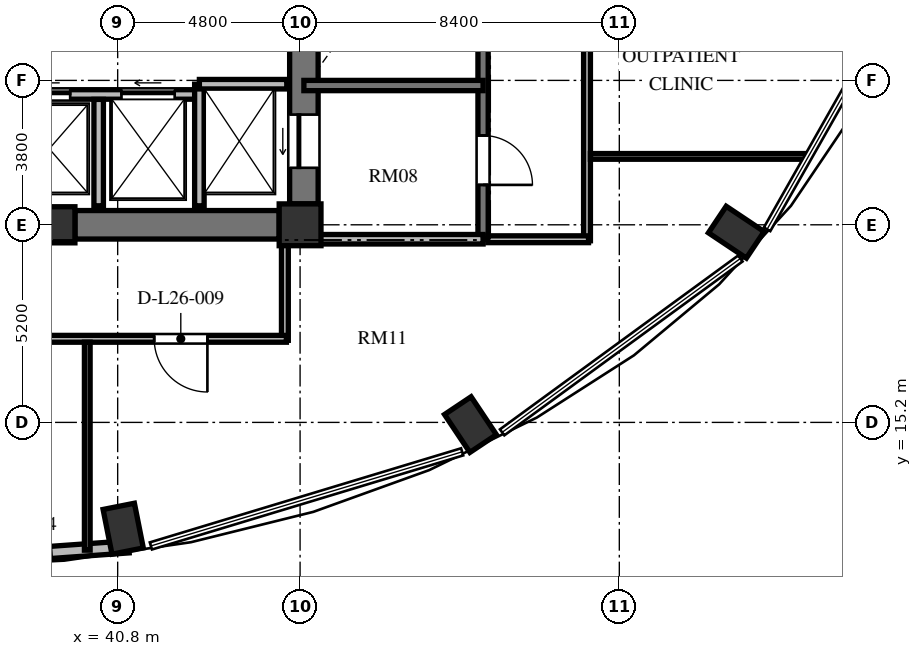
"""IFC4 building model, lengths in metres.
Left out: names, types, materials, properties, quantities, classifications, styles, units other than length and angle.
Written with IfcOpenShell. Run it as: python <this file> out.ifc"""

import sys

from ifc_helpers import new_model, si_unit, direction, frame, frame_2d, origin, origin_2d, place, context, subcontext, project, spatial, rectangle, extrude, element, fill, save


model = new_model("IFC4")
c1 = context("Model", 3, precision=1e-05, world=origin(), true_north=direction((0.0, 1.0)))
c2 = subcontext(c1, "Body", "Model", "MODEL_VIEW")
j1 = project(units=[si_unit("LENGTHUNIT", "METRE"), si_unit("PLANEANGLEUNIT", "RADIAN")], contexts=[c1])
p1 = place(None, origin())
s1 = spatial("IfcSite", under=j1, at=p1, CompositionType="ELEMENT")
p2 = place(p1, origin())
s2 = spatial("IfcBuilding", under=s1, at=p2, CompositionType="ELEMENT")
p3 = place(p2, frame((0.0, 0.0, 103.632)))
s3 = spatial("IfcBuildingStorey", under=s2, at=p3, CompositionType="ELEMENT", Elevation=103.632)
for number, where, z_axis, x_axis in (
    (1, (40.946, 12.403, 0.0), (0.0, 0.0, 1.0), (0.195, -0.981, 0.0)),
    (2, (50.084, 15.143, 0.0), (0.0, 0.0, 1.0), (0.556, -0.831, 0.0)),
    (3, (57.078, 20.205, 0.0), (0.0, 0.0, 1.0), (0.831, -0.556, 0.0)),
):
    element("IfcColumn", number, at=place(p3, frame(where, z_axis=z_axis, x_axis=x_axis)), inside=s3, PredefinedType="COLUMN", context=c2, shape_type="SweptSolid", body=[
        extrude(rectangle(XDim=1.2, YDim=0.84, at=origin_2d()), origin(), (0.0, 0.0, 1.0), 3.648),
    ])
p4 = place(p3, frame((39.2, 20.4, 0.0), z_axis=(0.0, 0.0, 1.0), x_axis=(1.0, 0.0, 0.0)))
e4 = element("IfcColumn", 4, at=p4, inside=s3, PredefinedType="COLUMN", context=c2, shape_type="SweptSolid", body=[
    extrude(rectangle(XDim=0.95, YDim=0.95, at=origin_2d()), origin(), (0.0, 0.0, 1.0), 3.648),
])
p5 = place(p3, frame((45.6, 20.4, 0.0), z_axis=(0.0, 0.0, 1.0), x_axis=(1.0, 0.0, 0.0)))
e5 = element("IfcColumn", 5, at=p5, inside=s3, PredefinedType="COLUMN", context=c2, shape_type="SweptSolid", body=[
    extrude(rectangle(XDim=1.1, YDim=1.1, at=origin_2d()), origin(), (0.0, 0.0, 1.0), 3.648),
])
p6 = place(p3, frame((45.7, 20.95, 0.0), z_axis=(0.0, 0.0, 1.0), x_axis=(0.0, 1.0, 0.0)))
e6 = element("IfcWall", 6, at=p6, inside=s3, PredefinedType="SHEAR", context=c2, shape_type="SweptSolid", body=[
    extrude(rectangle(XDim=14.1, YDim=0.75, at=frame_2d((7.05, 0.0))), origin(), (0.0, 0.0, 1.0), 3.648),
])
p7 = place(p6, frame((11.75, 0.0, 0.0)))
e7 = element("IfcOpeningElement", 7, at=p7, cuts=e6, PredefinedType="OPENING", context=c2, shape_type="SweptSolid", body=[
    extrude(rectangle(XDim=1.4, YDim=2.3, at=frame_2d((0.7, 1.15))), frame((0.0, 0.385, 0.0), z_axis=(0.0, -1.0, 0.0), x_axis=(1.0, 0.0, 0.0)), (0.0, 0.0, 1.0), 0.77),
])
p8 = place(p6, frame((0.95, 0.0, 0.0)))
e8 = element("IfcOpeningElement", 8, at=p8, cuts=e6, PredefinedType="OPENING", context=c2, shape_type="SweptSolid", body=[
    extrude(rectangle(XDim=1.4, YDim=2.3, at=frame_2d((0.7, 1.15))), frame((0.0, 0.385, 0.0), z_axis=(0.0, -1.0, 0.0), x_axis=(1.0, 0.0, 0.0)), (0.0, 0.0, 1.0), 0.77),
])
p9 = place(p3, frame((39.675, 20.4, 0.0), z_axis=(0.0, 0.0, 1.0), x_axis=(1.0, 0.0, 0.0)))
e9 = element("IfcWall", 9, at=p9, inside=s3, PredefinedType="SHEAR", context=c2, shape_type="SweptSolid", body=[
    extrude(rectangle(XDim=5.375, YDim=0.75, at=frame_2d((2.688, 0.0))), origin(), (0.0, 0.0, 1.0), 3.648),
])
p10 = place(p3, frame((35.821, 11.547, 0.0), z_axis=(0.0, 0.0, 1.0), x_axis=(0.997432364291, 0.071614793619, 0.0)))
e10 = element("IfcWall", 10, at=p10, inside=s3, PredefinedType="SOLIDWALL", context=c2, shape_type="SweptSolid", body=[
    extrude(rectangle(XDim=5.284, YDim=0.32, at=frame_2d((2.642, 0.0))), origin(), (0.0, 0.0, 1.0), 3.428),
])
p11 = place(p10, frame((2.042, 0.0, 0.85)))
e11 = element("IfcOpeningElement", 11, at=p11, cuts=e10, PredefinedType="OPENING", context=c2, shape_type="SweptSolid", body=[
    extrude(rectangle(XDim=1.2, YDim=1.8, at=frame_2d((0.6, 0.9))), frame((0.0, 0.17, 0.0), z_axis=(0.0, -1.0, 0.0), x_axis=(1.0, 0.0, 0.0)), (0.0, 0.0, 1.0), 0.34),
])
p12 = place(p3, frame((26.75, 23.83, 0.0), z_axis=(0.0, 0.0, 1.0), x_axis=(1.0, 0.0, 0.0)))
e12 = element("IfcWall", 12, at=p12, inside=s3, PredefinedType="SOLIDWALL", context=c2, shape_type="SweptSolid", body=[
    extrude(rectangle(XDim=16.2, YDim=0.25, at=frame_2d((8.1, 0.0))), origin(), (0.0, 0.0, 1.0), 3.428),
])
p13 = place(p12, frame((0.9, 0.0, 0.0)))
e13 = element("IfcOpeningElement", 13, at=p13, cuts=e12, PredefinedType="OPENING", context=c2, shape_type="SweptSolid", body=[
    extrude(rectangle(XDim=1.1, YDim=2.2, at=frame_2d((0.55, 1.1))), frame((0.0, 0.135, 0.0), z_axis=(0.0, -1.0, 0.0), x_axis=(1.0, 0.0, 0.0)), (0.0, 0.0, 1.0), 0.27),
])
p14 = place(p12, frame((3.5, 0.0, 0.0)))
e14 = element("IfcOpeningElement", 14, at=p14, cuts=e12, PredefinedType="OPENING", context=c2, shape_type="SweptSolid", body=[
    extrude(rectangle(XDim=1.1, YDim=2.2, at=frame_2d((0.55, 1.1))), frame((0.0, 0.135, 0.0), z_axis=(0.0, -1.0, 0.0), x_axis=(1.0, 0.0, 0.0)), (0.0, 0.0, 1.0), 0.27),
])
p15 = place(p12, frame((6.3, 0.0, 0.0)))
e15 = element("IfcOpeningElement", 15, at=p15, cuts=e12, PredefinedType="OPENING", context=c2, shape_type="SweptSolid", body=[
    extrude(rectangle(XDim=1.1, YDim=2.2, at=frame_2d((0.55, 1.1))), frame((0.0, 0.135, 0.0), z_axis=(0.0, -1.0, 0.0), x_axis=(1.0, 0.0, 0.0)), (0.0, 0.0, 1.0), 0.27),
])
p16 = place(p12, frame((8.9, 0.0, 0.0)))
e16 = element("IfcOpeningElement", 16, at=p16, cuts=e12, PredefinedType="OPENING", context=c2, shape_type="SweptSolid", body=[
    extrude(rectangle(XDim=1.1, YDim=2.2, at=frame_2d((0.55, 1.1))), frame((0.0, 0.135, 0.0), z_axis=(0.0, -1.0, 0.0), x_axis=(1.0, 0.0, 0.0)), (0.0, 0.0, 1.0), 0.27),
])
p17 = place(p12, frame((11.7, 0.0, 0.0)))
e17 = element("IfcOpeningElement", 17, at=p17, cuts=e12, PredefinedType="OPENING", context=c2, shape_type="SweptSolid", body=[
    extrude(rectangle(XDim=1.1, YDim=2.2, at=frame_2d((0.55, 1.1))), frame((0.0, 0.135, 0.0), z_axis=(0.0, -1.0, 0.0), x_axis=(1.0, 0.0, 0.0)), (0.0, 0.0, 1.0), 0.27),
])
p18 = place(p12, frame((14.15, 0.0, 0.0)))
e18 = element("IfcOpeningElement", 18, at=p18, cuts=e12, PredefinedType="OPENING", context=c2, shape_type="SweptSolid", body=[
    extrude(rectangle(XDim=1.4, YDim=2.3, at=frame_2d((0.7, 1.15))), frame((0.0, 0.135, 0.0), z_axis=(0.0, -1.0, 0.0), x_axis=(1.0, 0.0, 0.0)), (0.0, 0.0, 1.0), 0.27),
])
p19 = place(p3, frame((42.95, 20.9, 0.0), z_axis=(0.0, 0.0, 1.0), x_axis=(0.0, 1.0, 0.0)))
e19 = element("IfcWall", 19, at=p19, inside=s3, PredefinedType="SOLIDWALL", context=c2, shape_type="SweptSolid", body=[
    extrude(rectangle(XDim=3.2, YDim=0.25, at=frame_2d((1.6, 0.0))), origin(), (0.0, 0.0, 1.0), 3.428),
])
p20 = place(p3, frame((42.95, 24.1, 0.0), z_axis=(0.0, 0.0, 1.0), x_axis=(1.0, 0.0, 0.0)))
e20 = element("IfcWall", 20, at=p20, inside=s3, PredefinedType="SOLIDWALL", context=c2, shape_type="SweptSolid", body=[
    extrude(rectangle(XDim=2.3, YDim=0.25, at=frame_2d((1.15, 0.0))), origin(), (0.0, 0.0, 1.0), 3.428),
])
p21 = place(p3, frame((40.3, 20.9, 0.0), z_axis=(0.0, 0.0, 1.0), x_axis=(0.0, 1.0, 0.0)))
e21 = element("IfcWall", 21, at=p21, inside=s3, PredefinedType="SOLIDWALL", context=c2, shape_type="SweptSolid", body=[
    extrude(rectangle(XDim=2.8, YDim=0.25, at=frame_2d((1.4, 0.0))), origin(), (0.0, 0.0, 1.0), 3.428),
])
p22 = place(p3, frame((50.415, 35.845, 0.0), z_axis=(0.0, 0.0, 1.0), x_axis=(0.0, -1.0, 0.0)))
e22 = element("IfcWall", 22, at=p22, inside=s3, PredefinedType="SHEAR", context=c2, shape_type="SweptSolid", body=[
    extrude(rectangle(XDim=15.825, YDim=0.27, at=frame_2d((7.913, 0.0))), origin(), (0.0, 0.0, 1.0), 3.648),
])
p23 = place(p22, frame((4.445, 0.0, 0.0)))
e23 = element("IfcOpeningElement", 23, at=p23, cuts=e22, PredefinedType="OPENING", context=c2, shape_type="SweptSolid", body=[
    extrude(rectangle(XDim=1.2, YDim=2.15, at=frame_2d((0.6, 1.075))), frame((0.0, 0.145, 0.0), z_axis=(0.0, -1.0, 0.0), x_axis=(1.0, 0.0, 0.0)), (0.0, 0.0, 1.0), 0.29),
])
p24 = place(p22, frame((1.295, 0.0, 0.0)))
e24 = element("IfcOpeningElement", 24, at=p24, cuts=e22, PredefinedType="OPENING", context=c2, shape_type="SweptSolid", body=[
    extrude(rectangle(XDim=1.3, YDim=2.2, at=frame_2d((0.65, 1.1))), frame((0.0, 0.145, 0.0), z_axis=(0.0, -1.0, 0.0), x_axis=(1.0, 0.0, 0.0)), (0.0, 0.0, 1.0), 0.29),
])
p25 = place(p22, frame((13.095, 0.0, 0.0)))
e25 = element("IfcOpeningElement", 25, at=p25, cuts=e22, PredefinedType="OPENING", context=c2, shape_type="SweptSolid", body=[
    extrude(rectangle(XDim=1.3, YDim=2.2, at=frame_2d((0.65, 1.1))), frame((0.0, 0.145, 0.0), z_axis=(0.0, -1.0, 0.0), x_axis=(1.0, 0.0, 0.0)), (0.0, 0.0, 1.0), 0.29),
])
p26 = place(p3, frame((45.7, 24.065, 0.0), z_axis=(0.0, 0.0, 1.0), x_axis=(1.0, 0.0, 0.0)))
e26 = element("IfcWall", 26, at=p26, inside=s3, PredefinedType="SHEAR", context=c2, shape_type="SweptSolid", body=[
    extrude(rectangle(XDim=4.715, YDim=0.27, at=frame_2d((2.357, 0.0))), origin(), (0.0, 0.0, 1.0), 3.648),
])
p27 = place(p3, frame((45.7, 20.02, 0.0), z_axis=(0.0, 0.0, 1.0), x_axis=(1.0, 0.0, 0.0)))
e27 = element("IfcWall", 27, at=p27, inside=s3, PredefinedType="SOLIDWALL", context=c2, shape_type="SweptSolid", body=[
    extrude(rectangle(XDim=4.715, YDim=0.25, at=frame_2d((2.357, 0.0))), origin(), (0.0, 0.0, 1.0), 3.428),
])
p28 = place(p3, frame((53.15, 26.64, 0.0), z_axis=(0.0, 0.0, 1.0), x_axis=(0.0, -1.0, 0.0)))
e28 = element("IfcWall", 28, at=p28, inside=s3, PredefinedType="PARTITIONING", context=c2, shape_type="SweptSolid", body=[
    extrude(rectangle(XDim=6.66, YDim=0.18, at=frame_2d((3.33, 0.0))), origin(), (0.0, 0.0, 1.0), 3.428),
])
p29 = place(p3, frame((53.19, 20.02, 0.0), z_axis=(0.0, 0.0, 1.0), x_axis=(-1.0, 0.0, 0.0)))
e29 = element("IfcWall", 29, at=p29, inside=s3, PredefinedType="PARTITIONING", context=c2, shape_type="SweptSolid", body=[
    extrude(rectangle(XDim=2.65, YDim=0.18, at=frame_2d((1.325, 0.0))), origin(), (0.0, 0.0, 1.0), 3.428),
])
p30 = place(p3, frame((45.2, 19.91, 0.0), z_axis=(0.0, 0.0, 1.0), x_axis=(0.0, -1.0, 0.0)))
e30 = element("IfcWall", 30, at=p30, inside=s3, PredefinedType="PARTITIONING", context=c2, shape_type="SweptSolid", body=[
    extrude(rectangle(XDim=2.55, YDim=0.18, at=frame_2d((1.275, 0.0))), origin(), (0.0, 0.0, 1.0), 3.428),
])
p31 = place(p3, frame((45.24, 17.4, 0.0), z_axis=(0.0, 0.0, 1.0), x_axis=(-1.0, 0.0, 0.0)))
e31 = element("IfcWall", 31, at=p31, inside=s3, PredefinedType="PARTITIONING", context=c2, shape_type="SweptSolid", body=[
    extrude(rectangle(XDim=21.93, YDim=0.18, at=frame_2d((10.965, 0.0))), origin(), (0.0, 0.0, 1.0), 3.053),
])
p32 = place(p31, frame((17.477, 0.0, 0.0)))
e32 = element("IfcOpeningElement", 32, at=p32, cuts=e31, PredefinedType="OPENING", context=c2, shape_type="SweptSolid", body=[
    extrude(rectangle(XDim=1.4, YDim=2.2, at=frame_2d((0.7, 1.1))), frame((0.0, 0.1, 0.0), z_axis=(0.0, -1.0, 0.0), x_axis=(1.0, 0.0, 0.0)), (0.0, 0.0, 1.0), 0.2),
])
p33 = place(p31, frame((9.291, 0.0, 0.0)))
e33 = element("IfcOpeningElement", 33, at=p33, cuts=e31, PredefinedType="OPENING", context=c2, shape_type="SweptSolid", body=[
    extrude(rectangle(XDim=1.4, YDim=2.2, at=frame_2d((0.7, 1.1))), frame((0.0, 0.1, 0.0), z_axis=(0.0, -1.0, 0.0), x_axis=(1.0, 0.0, 0.0)), (0.0, 0.0, 1.0), 0.2),
])
p34 = place(p31, frame((2.079, 0.0, 0.0)))
e34 = element("IfcOpeningElement", 34, at=p34, cuts=e31, PredefinedType="OPENING", context=c2, shape_type="SweptSolid", body=[
    extrude(rectangle(XDim=1.4, YDim=2.2, at=frame_2d((0.7, 1.1))), frame((0.0, 0.1, 0.0), z_axis=(0.0, -1.0, 0.0), x_axis=(1.0, 0.0, 0.0)), (0.0, 0.0, 1.0), 0.2),
])
p35 = place(p3, frame((53.24, 22.2, 0.0), z_axis=(0.0, 0.0, 1.0), x_axis=(1.0, 0.0, 0.0)))
e35 = element("IfcWall", 35, at=p35, inside=s3, PredefinedType="PARTITIONING", context=c2, shape_type="SweptSolid", body=[
    extrude(rectangle(XDim=5.731, YDim=0.15, at=frame_2d((2.866, 0.0))), origin(), (0.0, 0.0, 1.0), 3.428),
])
p36 = place(p3, frame((40.0, 11.837, 0.0), z_axis=(0.0, 0.0, 1.0), x_axis=(0.0, 1.0, 0.0)))
e36 = element("IfcWall", 36, at=p36, inside=s3, PredefinedType="PARTITIONING", context=c2, shape_type="SweptSolid", body=[
    extrude(rectangle(XDim=5.473, YDim=0.15, at=frame_2d((2.736, 0.0))), origin(), (0.0, 0.0, 1.0), 2.813),
])
p37 = place(p17, origin())
e37 = element("IfcDoor", 37, at=p37, inside=s3, OperationType="SLIDING_TO_LEFT", PredefinedType="DOOR", context=c2, shape_type="SweptSolid", body=[
    extrude(rectangle(XDim=1.1, YDim=2.2, at=frame_2d((0.55, 1.1))), frame((0.0, 0.025, 0.0), z_axis=(0.0, -1.0, 0.0), x_axis=(1.0, 0.0, 0.0)), (0.0, 0.0, 1.0), 0.05),
])
fill(e17, e37)
p38 = place(p8, origin())
e38 = element("IfcDoor", 38, at=p38, inside=s3, OperationType="SLIDING_TO_LEFT", PredefinedType="DOOR", context=c2, shape_type="SweptSolid", body=[
    extrude(rectangle(XDim=1.4, YDim=2.3, at=frame_2d((0.7, 1.15))), frame((0.0, 0.025, 0.0), z_axis=(0.0, -1.0, 0.0), x_axis=(1.0, 0.0, 0.0)), (0.0, 0.0, 1.0), 0.05),
])
fill(e8, e38)
p39 = place(p18, origin())
e39 = element("IfcDoor", 39, at=p39, inside=s3, OperationType="SLIDING_TO_LEFT", PredefinedType="DOOR", context=c2, shape_type="SweptSolid", body=[
    extrude(rectangle(XDim=1.4, YDim=2.3, at=frame_2d((0.7, 1.15))), frame((0.0, 0.025, 0.0), z_axis=(0.0, -1.0, 0.0), x_axis=(1.0, 0.0, 0.0)), (0.0, 0.0, 1.0), 0.05),
])
fill(e18, e39)
p40 = place(p25, origin())
e40 = element("IfcDoor", 40, at=p40, inside=s3, OperationType="SINGLE_SWING_RIGHT", PredefinedType="DOOR", context=c2, shape_type="SweptSolid", body=[
    extrude(rectangle(XDim=1.3, YDim=2.2, at=frame_2d((0.65, 1.1))), frame((0.0, 0.025, 0.0), z_axis=(0.0, -1.0, 0.0), x_axis=(1.0, 0.0, 0.0)), (0.0, 0.0, 1.0), 0.05),
])
fill(e25, e40)
p41 = place(p34, origin())
e41 = element("IfcDoor", 41, at=p41, inside=s3, OperationType="SINGLE_SWING_LEFT", PredefinedType="DOOR", context=c2, shape_type="SweptSolid", body=[
    extrude(rectangle(XDim=1.4, YDim=2.2, at=frame_2d((0.7, 1.1))), frame((0.0, 0.025, 0.0), z_axis=(0.0, -1.0, 0.0), x_axis=(1.0, 0.0, 0.0)), (0.0, 0.0, 1.0), 0.05),
])
fill(e34, e41)
save(model, sys.argv[1])
